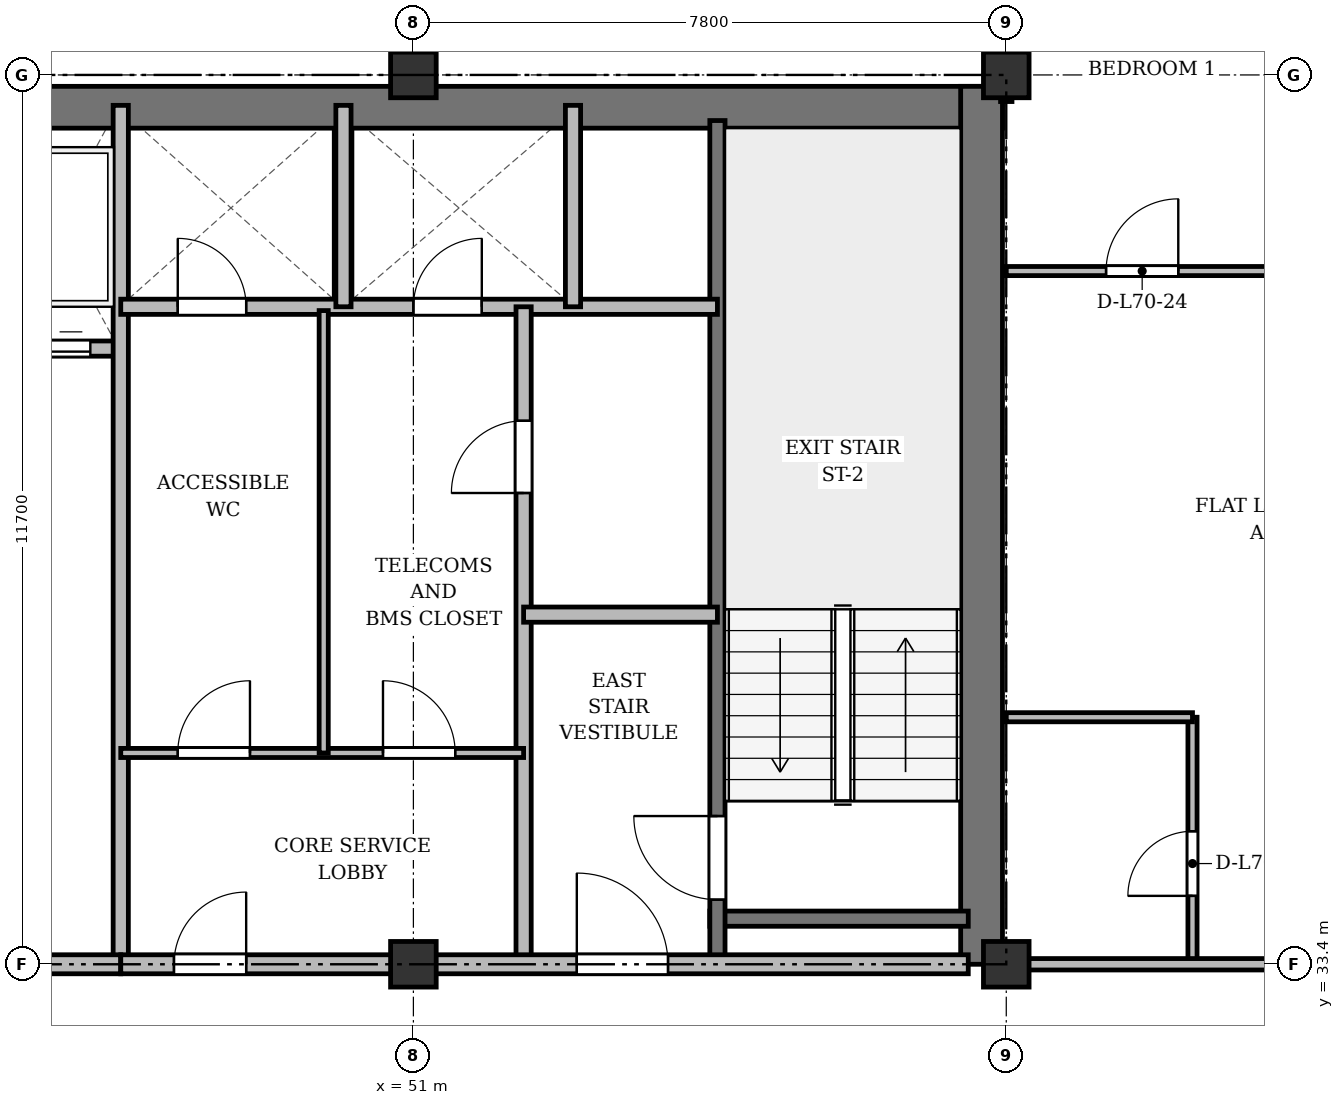
"""IFC4 building model, lengths in metres.
Left out: names, types, materials, properties, quantities, classifications, styles, units other than length and angle.
Written with IfcOpenShell. Run it as: python <this file> out.ifc"""

import sys

from ifc_helpers import new_model, si_unit, direction, frame, frame_2d, origin, origin_2d, place, context, subcontext, project, spatial, rectangle, extrude, source, transform, mapped, element, fill, save


model = new_model("IFC4")
c1 = context("Model", 3, precision=1e-05, world=origin(), true_north=direction((0.0, 1.0)))
c2 = subcontext(c1, "Body", "Model", "MODEL_VIEW")
j1 = project(units=[si_unit("LENGTHUNIT", "METRE"), si_unit("PLANEANGLEUNIT", "RADIAN")], contexts=[c1])
p1 = place(None, origin())
s1 = spatial("IfcSite", under=j1, at=p1, CompositionType="ELEMENT")
p2 = place(p1, origin())
s2 = spatial("IfcBuilding", under=s1, at=p2, CompositionType="ELEMENT")
p3 = place(p2, frame((0.0, 0.0, 270.3)))
s3 = spatial("IfcBuildingStorey", under=s2, at=p3, CompositionType="ELEMENT", Elevation=270.3)
m1 = source(origin(), c2, "Body", "SweptSolid", [
    extrude(rectangle(XDim=0.6, YDim=0.6, at=origin_2d()), origin(), (0.0, 0.0, 1.0), 3.6),
])
for number, where, z_axis, x_axis in (
    (1, (51.0, 33.4, 0.0), (0.0, 0.0, 1.0), (1.0, 0.0, 0.0)),
    (2, (51.0, 45.1, 0.0), (0.0, 0.0, 1.0), (1.0, 0.0, 0.0)),
    (3, (58.8, 33.4, 0.0), (0.0, 0.0, 1.0), (1.0, 0.0, 0.0)),
    (4, (58.8, 45.1, 0.0), (0.0, 0.0, 1.0), (1.0, 0.0, 0.0)),
):
    element("IfcColumn", number, at=place(p3, frame(where, z_axis=z_axis, x_axis=x_axis)), inside=s3, PredefinedType="COLUMN", context=c2, shape_type="MappedRepresentation", body=[
        mapped(m1, transform((0.0, 0.0, 0.0), x_axis=(1.0, 0.0, 0.0), y_axis=(0.0, 1.0, 0.0), z_axis=(0.0, 0.0, 1.0), scale=1.0)),
    ])
p4 = place(p3, frame((15.65, 44.675, 0.0), z_axis=(0.0, 0.0, 1.0), x_axis=(1.0, 0.0, 0.0)))
e5 = element("IfcWall", 5, at=p4, inside=s3, PredefinedType="SHEAR", context=c2, shape_type="SweptSolid", body=[
    extrude(rectangle(XDim=43.1, YDim=0.55, at=frame_2d((21.55, 0.0))), origin(), (0.0, 0.0, 1.0), 3.37),
])
p5 = place(p3, frame((58.475, 33.4, 0.0), z_axis=(0.0, 0.0, 1.0), x_axis=(0.0, 1.0, 0.0)))
e6 = element("IfcWall", 6, at=p5, inside=s3, PredefinedType="SHEAR", context=c2, shape_type="SweptSolid", body=[
    extrude(rectangle(XDim=11.55, YDim=0.55, at=frame_2d((5.775, 0.0))), origin(), (0.0, 0.0, 1.0), 3.37),
])
p6 = place(p3, frame((54.9, 34.0, 0.0), z_axis=(0.0, 0.0, 1.0), x_axis=(1.0, 0.0, 0.0)))
e7 = element("IfcWall", 7, at=p6, inside=s3, PredefinedType="SHEAR", context=c2, shape_type="SweptSolid", body=[
    extrude(rectangle(XDim=3.4, YDim=0.2, at=frame_2d((1.7, 0.0))), origin(), (0.0, 0.0, 1.0), 3.37),
])
p7 = place(p3, frame((55.0, 33.4, 0.0), z_axis=(0.0, 0.0, 1.0), x_axis=(0.0, 1.0, 0.0)))
e8 = element("IfcWall", 8, at=p7, inside=s3, PredefinedType="SHEAR", context=c2, shape_type="SweptSolid", body=[
    extrude(rectangle(XDim=11.1, YDim=0.2, at=frame_2d((5.55, 0.0))), origin(), (0.0, 0.0, 1.0), 3.37),
])
p8 = place(p7, frame((0.85, 0.0, 0.0)))
e9 = element("IfcOpeningElement", 9, at=p8, cuts=e8, PredefinedType="OPENING", context=c2, shape_type="SweptSolid", body=[
    extrude(rectangle(XDim=1.1, YDim=2.15, at=frame_2d((0.55, 1.075))), frame((0.0, 0.11, 0.0), z_axis=(0.0, -1.0, 0.0), x_axis=(1.0, 0.0, 0.0)), (0.0, 0.0, 1.0), 0.22),
])
p9 = place(p3, frame((40.25, 41.5, 0.0), z_axis=(0.0, 0.0, 1.0), x_axis=(1.0, 0.0, 0.0)))
e10 = element("IfcWall", 10, at=p9, inside=s3, PredefinedType="SOLIDWALL", context=c2, shape_type="SweptSolid", body=[
    extrude(rectangle(XDim=6.9, YDim=0.2, at=frame_2d((3.45, 0.0))), origin(), (0.0, 0.0, 1.0), 3.37),
])
p10 = place(p9, frame((0.35, 0.0, 0.0)))
e11 = element("IfcOpeningElement", 11, at=p10, cuts=e10, PredefinedType="OPENING", context=c2, shape_type="SweptSolid", body=[
    extrude(rectangle(XDim=1.05, YDim=2.15, at=frame_2d((0.525, 1.075))), frame((0.0, 0.11, 0.0), z_axis=(0.0, -1.0, 0.0), x_axis=(1.0, 0.0, 0.0)), (0.0, 0.0, 1.0), 0.22),
])
p11 = place(p9, frame((2.05, 0.0, 0.0)))
e12 = element("IfcOpeningElement", 12, at=p11, cuts=e10, PredefinedType="OPENING", context=c2, shape_type="SweptSolid", body=[
    extrude(rectangle(XDim=1.05, YDim=2.15, at=frame_2d((0.525, 1.075))), frame((0.0, 0.11, 0.0), z_axis=(0.0, -1.0, 0.0), x_axis=(1.0, 0.0, 0.0)), (0.0, 0.0, 1.0), 0.22),
])
p12 = place(p9, frame((3.75, 0.0, 0.0)))
e13 = element("IfcOpeningElement", 13, at=p12, cuts=e10, PredefinedType="OPENING", context=c2, shape_type="SweptSolid", body=[
    extrude(rectangle(XDim=1.05, YDim=2.15, at=frame_2d((0.525, 1.075))), frame((0.0, 0.11, 0.0), z_axis=(0.0, -1.0, 0.0), x_axis=(1.0, 0.0, 0.0)), (0.0, 0.0, 1.0), 0.22),
])
p13 = place(p9, frame((5.45, 0.0, 0.0)))
e14 = element("IfcOpeningElement", 14, at=p13, cuts=e10, PredefinedType="OPENING", context=c2, shape_type="SweptSolid", body=[
    extrude(rectangle(XDim=1.05, YDim=2.15, at=frame_2d((0.525, 1.075))), frame((0.0, 0.11, 0.0), z_axis=(0.0, -1.0, 0.0), x_axis=(1.0, 0.0, 0.0)), (0.0, 0.0, 1.0), 0.22),
])
p14 = place(p3, frame((47.15, 33.4, 0.0), z_axis=(0.0, 0.0, 1.0), x_axis=(0.0, 1.0, 0.0)))
e15 = element("IfcWall", 15, at=p14, inside=s3, PredefinedType="SOLIDWALL", context=c2, shape_type="SweptSolid", body=[
    extrude(rectangle(XDim=11.3, YDim=0.2, at=frame_2d((5.65, 0.0))), origin(), (0.0, 0.0, 1.0), 2.92),
])
p15 = place(p3, frame((40.1, 33.4, 0.0), z_axis=(0.0, 0.0, 1.0), x_axis=(1.0, 0.0, 0.0)))
e16 = element("IfcWall", 16, at=p15, inside=s3, PredefinedType="PARTITIONING", context=c2, shape_type="SweptSolid", body=[
    extrude(rectangle(XDim=7.05, YDim=0.25, at=frame_2d((3.525, 0.0))), origin(), (0.0, 0.0, 1.0), 2.92),
])
p16 = place(p15, frame((0.65, 0.0, 0.0)))
e17 = element("IfcOpeningElement", 17, at=p16, cuts=e16, PredefinedType="OPENING", context=c2, shape_type="SweptSolid", body=[
    extrude(rectangle(XDim=1.6, YDim=2.2, at=frame_2d((0.8, 1.1))), frame((0.0, 0.135, 0.0), z_axis=(0.0, -1.0, 0.0), x_axis=(1.0, 0.0, 0.0)), (0.0, 0.0, 1.0), 0.27),
])
p17 = place(p3, frame((47.15, 42.05, 0.0), z_axis=(0.0, 0.0, 1.0), x_axis=(1.0, 0.0, 0.0)))
e18 = element("IfcWall", 18, at=p17, inside=s3, PredefinedType="SOLIDWALL", context=c2, shape_type="SweptSolid", body=[
    extrude(rectangle(XDim=7.85, YDim=0.2, at=frame_2d((3.925, 0.0))), origin(), (0.0, 0.0, 1.0), 2.87),
])
p18 = place(p17, frame((0.75, 0.0, 0.0)))
e19 = element("IfcOpeningElement", 19, at=p18, cuts=e18, PredefinedType="OPENING", context=c2, shape_type="SweptSolid", body=[
    extrude(rectangle(XDim=0.9, YDim=2.1, at=frame_2d((0.45, 1.05))), frame((0.0, 0.11, 0.0), z_axis=(0.0, -1.0, 0.0), x_axis=(1.0, 0.0, 0.0)), (0.0, 0.0, 1.0), 0.22),
])
p19 = place(p17, frame((3.85, 0.0, 0.0)))
e20 = element("IfcOpeningElement", 20, at=p19, cuts=e18, PredefinedType="OPENING", context=c2, shape_type="SweptSolid", body=[
    extrude(rectangle(XDim=0.9, YDim=2.1, at=frame_2d((0.45, 1.05))), frame((0.0, 0.11, 0.0), z_axis=(0.0, -1.0, 0.0), x_axis=(1.0, 0.0, 0.0)), (0.0, 0.0, 1.0), 0.22),
])
for number, where, z_axis, x_axis in (
    (21, (50.08, 42.05, 0.0), (0.0, 0.0, 1.0), (0.0, 1.0, 0.0)),
    (22, (53.1, 42.05, 0.0), (0.0, 0.0, 1.0), (0.0, 1.0, 0.0)),
):
    element("IfcWall", number, at=place(p3, frame(where, z_axis=z_axis, x_axis=x_axis)), inside=s3, PredefinedType="SOLIDWALL", context=c2, shape_type="SweptSolid", body=[
        extrude(rectangle(XDim=2.65, YDim=0.2, at=frame_2d((1.325, 0.0))), origin(), (0.0, 0.0, 1.0), 3.37),
    ])
p20 = place(p3, frame((52.45, 33.4, 0.0), z_axis=(0.0, 0.0, 1.0), x_axis=(0.0, 1.0, 0.0)))
e23 = element("IfcWall", 23, at=p20, inside=s3, PredefinedType="PARTITIONING", context=c2, shape_type="SweptSolid", body=[
    extrude(rectangle(XDim=8.65, YDim=0.2, at=frame_2d((4.325, 0.0))), origin(), (0.0, 0.0, 1.0), 2.92),
])
p21 = place(p20, frame((6.2, 0.0, 0.0)))
e24 = element("IfcOpeningElement", 24, at=p21, cuts=e23, PredefinedType="OPENING", context=c2, shape_type="SweptSolid", body=[
    extrude(rectangle(XDim=0.95, YDim=2.15, at=frame_2d((0.475, 1.075))), frame((0.0, 0.11, 0.0), z_axis=(0.0, -1.0, 0.0), x_axis=(1.0, 0.0, 0.0)), (0.0, 0.0, 1.0), 0.22),
])
p22 = place(p3, frame((52.45, 38.0, 0.0), z_axis=(0.0, 0.0, 1.0), x_axis=(1.0, 0.0, 0.0)))
e25 = element("IfcWall", 25, at=p22, inside=s3, PredefinedType="PARTITIONING", context=c2, shape_type="SweptSolid", body=[
    extrude(rectangle(XDim=2.55, YDim=0.2, at=frame_2d((1.275, 0.0))), origin(), (0.0, 0.0, 1.0), 3.37),
])
p23 = place(p3, frame((47.15, 36.18, 0.0), z_axis=(0.0, 0.0, 1.0), x_axis=(1.0, 0.0, 0.0)))
e26 = element("IfcWall", 26, at=p23, inside=s3, PredefinedType="PARTITIONING", context=c2, shape_type="SweptSolid", body=[
    extrude(rectangle(XDim=5.3, YDim=0.12, at=frame_2d((2.65, 0.0))), origin(), (0.0, 0.0, 1.0), 2.87),
])
p24 = place(p23, frame((0.75, 0.0, 0.0)))
e27 = element("IfcOpeningElement", 27, at=p24, cuts=e26, PredefinedType="OPENING", context=c2, shape_type="SweptSolid", body=[
    extrude(rectangle(XDim=0.95, YDim=2.15, at=frame_2d((0.475, 1.075))), frame((0.0, 0.07, 0.0), z_axis=(0.0, -1.0, 0.0), x_axis=(1.0, 0.0, 0.0)), (0.0, 0.0, 1.0), 0.14),
])
p25 = place(p23, frame((3.45, 0.0, 0.0)))
e28 = element("IfcOpeningElement", 28, at=p25, cuts=e26, PredefinedType="OPENING", context=c2, shape_type="SweptSolid", body=[
    extrude(rectangle(XDim=0.95, YDim=2.15, at=frame_2d((0.475, 1.075))), frame((0.0, 0.07, 0.0), z_axis=(0.0, -1.0, 0.0), x_axis=(1.0, 0.0, 0.0)), (0.0, 0.0, 1.0), 0.14),
])
p26 = place(p3, frame((49.82, 36.18, 0.0), z_axis=(0.0, 0.0, 1.0), x_axis=(0.0, 1.0, 0.0)))
e29 = element("IfcWall", 29, at=p26, inside=s3, PredefinedType="PARTITIONING", context=c2, shape_type="SweptSolid", body=[
    extrude(rectangle(XDim=5.82, YDim=0.12, at=frame_2d((2.91, 0.0))), origin(), (0.0, 0.0, 1.0), 3.37),
])
p27 = place(p3, frame((47.15, 33.4, 0.0), z_axis=(0.0, 0.0, 1.0), x_axis=(1.0, 0.0, 0.0)))
e30 = element("IfcWall", 30, at=p27, inside=s3, PredefinedType="PARTITIONING", context=c2, shape_type="SweptSolid", body=[
    extrude(rectangle(XDim=11.15, YDim=0.25, at=frame_2d((5.575, 0.0))), origin(), (0.0, 0.0, 1.0), 2.92),
])
p28 = place(p27, frame((0.7, 0.0, 0.0)))
e31 = element("IfcOpeningElement", 31, at=p28, cuts=e30, PredefinedType="OPENING", context=c2, shape_type="SweptSolid", body=[
    extrude(rectangle(XDim=0.95, YDim=2.15, at=frame_2d((0.475, 1.075))), frame((0.0, 0.135, 0.0), z_axis=(0.0, -1.0, 0.0), x_axis=(1.0, 0.0, 0.0)), (0.0, 0.0, 1.0), 0.27),
])
p29 = place(p27, frame((6.0, 0.0, 0.0)))
e32 = element("IfcOpeningElement", 32, at=p29, cuts=e30, PredefinedType="OPENING", context=c2, shape_type="SweptSolid", body=[
    extrude(rectangle(XDim=1.2, YDim=2.15, at=frame_2d((0.6, 1.075))), frame((0.0, 0.135, 0.0), z_axis=(0.0, -1.0, 0.0), x_axis=(1.0, 0.0, 0.0)), (0.0, 0.0, 1.0), 0.27),
])
p30 = place(p3, frame((61.25, 33.4, 0.0), z_axis=(0.0, 0.0, 1.0), x_axis=(0.0, 1.0, 0.0)))
e33 = element("IfcWall", 33, at=p30, inside=s3, PredefinedType="PARTITIONING", context=c2, shape_type="SweptSolid", body=[
    extrude(rectangle(XDim=3.25, YDim=0.12, at=frame_2d((1.625, 0.0))), origin(), (0.0, 0.0, 1.0), 2.92),
])
p31 = place(p30, frame((0.9, 0.0, 0.0)))
e34 = element("IfcOpeningElement", 34, at=p31, cuts=e33, PredefinedType="OPENING", context=c2, shape_type="SweptSolid", body=[
    extrude(rectangle(XDim=0.85, YDim=2.1, at=frame_2d((0.425, 1.05))), frame((0.0, 0.07, 0.0), z_axis=(0.0, -1.0, 0.0), x_axis=(1.0, 0.0, 0.0)), (0.0, 0.0, 1.0), 0.14),
])
p32 = place(p3, frame((58.8, 36.65, 0.0), z_axis=(0.0, 0.0, 1.0), x_axis=(1.0, 0.0, 0.0)))
e35 = element("IfcWall", 35, at=p32, inside=s3, PredefinedType="PARTITIONING", context=c2, shape_type="SweptSolid", body=[
    extrude(rectangle(XDim=2.45, YDim=0.12, at=frame_2d((1.225, 0.0))), origin(), (0.0, 0.0, 1.0), 2.87),
])
p33 = place(p3, frame((58.8, 42.52, 0.0), z_axis=(0.0, 0.0, 1.0), x_axis=(1.0, 0.0, 0.0)))
e36 = element("IfcWall", 36, at=p33, inside=s3, PredefinedType="PARTITIONING", context=c2, shape_type="SweptSolid", body=[
    extrude(rectangle(XDim=3.575, YDim=0.12, at=frame_2d((1.788, 0.0))), origin(), (0.0, 0.0, 1.0), 2.87),
])
p34 = place(p33, frame((1.313, 0.0, 0.0)))
e37 = element("IfcOpeningElement", 37, at=p34, cuts=e36, PredefinedType="OPENING", context=c2, shape_type="SweptSolid", body=[
    extrude(rectangle(XDim=0.95, YDim=2.15, at=frame_2d((0.475, 1.075))), frame((0.0, 0.07, 0.0), z_axis=(0.0, -1.0, 0.0), x_axis=(1.0, 0.0, 0.0)), (0.0, 0.0, 1.0), 0.14),
])
p35 = place(p3, frame((58.8, 33.4, 0.0), z_axis=(0.0, 0.0, 1.0), x_axis=(1.0, 0.0, 0.0)))
e38 = element("IfcWall", 38, at=p35, inside=s3, PredefinedType="PARTITIONING", context=c2, shape_type="SweptSolid", body=[
    extrude(rectangle(XDim=7.15, YDim=0.15, at=frame_2d((3.575, 0.0))), origin(), (0.0, 0.0, 1.0), 2.92),
])
p36 = place(p35, frame((4.08, 0.0, 0.0)))
e39 = element("IfcOpeningElement", 39, at=p36, cuts=e38, PredefinedType="OPENING", context=c2, shape_type="SweptSolid", body=[
    extrude(rectangle(XDim=0.95, YDim=2.15, at=frame_2d((0.475, 1.075))), frame((0.0, 0.085, 0.0), z_axis=(0.0, -1.0, 0.0), x_axis=(1.0, 0.0, 0.0)), (0.0, 0.0, 1.0), 0.17),
])
p37 = place(p3, frame((58.8, 44.75, 0.0), z_axis=(0.0, 0.0, 1.0), x_axis=(0.0, 1.0, 0.0)))
e40 = element("IfcWall", 40, at=p37, inside=s3, PredefinedType="PARTITIONING", context=c2, shape_type="SweptSolid", body=[
    extrude(rectangle(XDim=3.61, YDim=0.15, at=frame_2d((1.805, 0.0))), origin(), (0.0, 0.0, 1.0), 2.87),
])
p38 = place(p37, frame((1.1, 0.0, 0.0)))
e41 = element("IfcOpeningElement", 41, at=p38, cuts=e40, PredefinedType="OPENING", context=c2, shape_type="SweptSolid", body=[
    extrude(rectangle(XDim=0.95, YDim=2.15, at=frame_2d((0.475, 1.075))), frame((0.0, 0.085, 0.0), z_axis=(0.0, -1.0, 0.0), x_axis=(1.0, 0.0, 0.0)), (0.0, 0.0, 1.0), 0.17),
])
m2 = source(origin(), c2, "Body", "SweptSolid", [
    extrude(rectangle(XDim=1.1, YDim=2.15, at=frame_2d((0.55, 1.075))), frame((0.0, 0.025, 0.0), z_axis=(0.0, -1.0, 0.0), x_axis=(1.0, 0.0, 0.0)), (0.0, 0.0, 1.0), 0.05),
])
p39 = place(p8, origin())
e42 = element("IfcDoor", 42, at=p39, inside=s3, OperationType="SINGLE_SWING_RIGHT", PredefinedType="DOOR", context=c2, shape_type="MappedRepresentation", body=[
    mapped(m2, transform((0.0, 0.0, 0.0), x_axis=(1.0, 0.0, 0.0), y_axis=(0.0, 1.0, 0.0), z_axis=(0.0, 0.0, 1.0), scale=1.0)),
])
fill(e9, e42)
m3 = source(origin(), c2, "Body", "SweptSolid", [
    extrude(rectangle(XDim=1.05, YDim=2.15, at=frame_2d((0.525, 1.075))), frame((0.0, 0.025, 0.0), z_axis=(0.0, -1.0, 0.0), x_axis=(1.0, 0.0, 0.0)), (0.0, 0.0, 1.0), 0.05),
])
p40 = place(p13, origin())
e43 = element("IfcDoor", 43, at=p40, inside=s3, OperationType="DOUBLE_DOOR_SLIDING", PredefinedType="DOOR", context=c2, shape_type="MappedRepresentation", body=[
    mapped(m3, transform((0.0, 0.0, 0.0), x_axis=(1.0, 0.0, 0.0), y_axis=(0.0, 1.0, 0.0), z_axis=(0.0, 0.0, 1.0), scale=1.0)),
])
fill(e14, e43)
m4 = source(origin(), c2, "Body", "SweptSolid", [
    extrude(rectangle(XDim=0.9, YDim=2.1, at=frame_2d((0.45, 1.05))), frame((0.0, 0.025, 0.0), z_axis=(0.0, -1.0, 0.0), x_axis=(1.0, 0.0, 0.0)), (0.0, 0.0, 1.0), 0.05),
])
p41 = place(p18, origin())
e44 = element("IfcDoor", 44, at=p41, inside=s3, OperationType="SINGLE_SWING_LEFT", PredefinedType="DOOR", context=c2, shape_type="MappedRepresentation", body=[
    mapped(m4, transform((0.0, 0.0, 0.0), x_axis=(1.0, 0.0, 0.0), y_axis=(0.0, 1.0, 0.0), z_axis=(0.0, 0.0, 1.0), scale=1.0)),
])
fill(e19, e44)
p42 = place(p19, origin())
e45 = element("IfcDoor", 45, at=p42, inside=s3, OperationType="SINGLE_SWING_RIGHT", PredefinedType="DOOR", context=c2, shape_type="MappedRepresentation", body=[
    mapped(m4, transform((0.0, 0.0, 0.0), x_axis=(1.0, 0.0, 0.0), y_axis=(0.0, 1.0, 0.0), z_axis=(0.0, 0.0, 1.0), scale=1.0)),
])
fill(e20, e45)
m5 = source(origin(), c2, "Body", "SweptSolid", [
    extrude(rectangle(XDim=0.95, YDim=2.15, at=frame_2d((0.475, 1.075))), frame((0.0, 0.025, 0.0), z_axis=(0.0, -1.0, 0.0), x_axis=(1.0, 0.0, 0.0)), (0.0, 0.0, 1.0), 0.05),
])
p43 = place(p21, origin())
e46 = element("IfcDoor", 46, at=p43, inside=s3, OperationType="SINGLE_SWING_LEFT", PredefinedType="DOOR", context=c2, shape_type="MappedRepresentation", body=[
    mapped(m5, transform((0.0, 0.0, 0.0), x_axis=(1.0, 0.0, 0.0), y_axis=(0.0, 1.0, 0.0), z_axis=(0.0, 0.0, 1.0), scale=1.0)),
])
fill(e24, e46)
p44 = place(p24, origin())
e47 = element("IfcDoor", 47, at=p44, inside=s3, OperationType="SINGLE_SWING_RIGHT", PredefinedType="DOOR", context=c2, shape_type="MappedRepresentation", body=[
    mapped(m5, transform((0.0, 0.0, 0.0), x_axis=(1.0, 0.0, 0.0), y_axis=(0.0, 1.0, 0.0), z_axis=(0.0, 0.0, 1.0), scale=1.0)),
])
fill(e27, e47)
p45 = place(p25, origin())
e48 = element("IfcDoor", 48, at=p45, inside=s3, OperationType="SINGLE_SWING_LEFT", PredefinedType="DOOR", context=c2, shape_type="MappedRepresentation", body=[
    mapped(m5, transform((0.0, 0.0, 0.0), x_axis=(1.0, 0.0, 0.0), y_axis=(0.0, 1.0, 0.0), z_axis=(0.0, 0.0, 1.0), scale=1.0)),
])
fill(e28, e48)
p46 = place(p28, origin())
e49 = element("IfcDoor", 49, at=p46, inside=s3, OperationType="SINGLE_SWING_RIGHT", PredefinedType="DOOR", context=c2, shape_type="MappedRepresentation", body=[
    mapped(m5, transform((0.0, 0.0, 0.0), x_axis=(1.0, 0.0, 0.0), y_axis=(0.0, 1.0, 0.0), z_axis=(0.0, 0.0, 1.0), scale=1.0)),
])
fill(e31, e49)
m6 = source(origin(), c2, "Body", "SweptSolid", [
    extrude(rectangle(XDim=1.2, YDim=2.15, at=frame_2d((0.6, 1.075))), frame((0.0, 0.025, 0.0), z_axis=(0.0, -1.0, 0.0), x_axis=(1.0, 0.0, 0.0)), (0.0, 0.0, 1.0), 0.05),
])
p47 = place(p29, origin())
e50 = element("IfcDoor", 50, at=p47, inside=s3, OperationType="SINGLE_SWING_LEFT", PredefinedType="DOOR", context=c2, shape_type="MappedRepresentation", body=[
    mapped(m6, transform((0.0, 0.0, 0.0), x_axis=(1.0, 0.0, 0.0), y_axis=(0.0, 1.0, 0.0), z_axis=(0.0, 0.0, 1.0), scale=1.0)),
])
fill(e32, e50)
m7 = source(origin(), c2, "Body", "SweptSolid", [
    extrude(rectangle(XDim=0.85, YDim=2.1, at=frame_2d((0.425, 1.05))), frame((0.0, 0.025, 0.0), z_axis=(0.0, -1.0, 0.0), x_axis=(1.0, 0.0, 0.0)), (0.0, 0.0, 1.0), 0.05),
])
p48 = place(p31, origin())
e51 = element("IfcDoor", 51, at=p48, inside=s3, OperationType="SINGLE_SWING_LEFT", PredefinedType="DOOR", context=c2, shape_type="MappedRepresentation", body=[
    mapped(m7, transform((0.0, 0.0, 0.0), x_axis=(1.0, 0.0, 0.0), y_axis=(0.0, 1.0, 0.0), z_axis=(0.0, 0.0, 1.0), scale=1.0)),
])
fill(e34, e51)
p49 = place(p34, origin())
e52 = element("IfcDoor", 52, at=p49, inside=s3, OperationType="SINGLE_SWING_RIGHT", PredefinedType="DOOR", context=c2, shape_type="MappedRepresentation", body=[
    mapped(m5, transform((0.0, 0.0, 0.0), x_axis=(1.0, 0.0, 0.0), y_axis=(0.0, 1.0, 0.0), z_axis=(0.0, 0.0, 1.0), scale=1.0)),
])
fill(e37, e52)
save(model, sys.argv[1])
